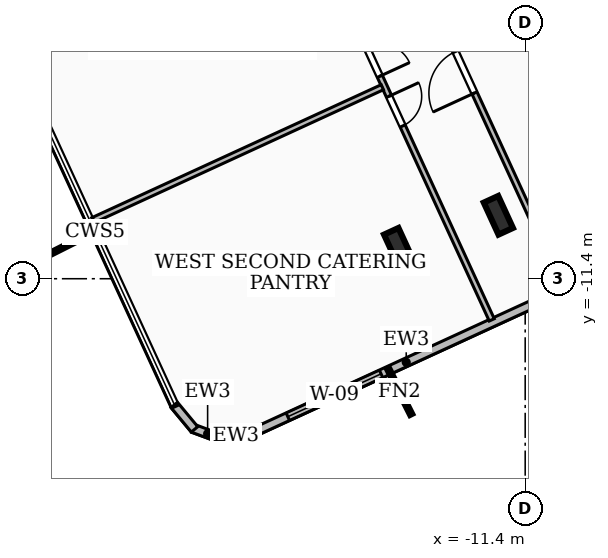
"""IFC4 building model, lengths in metres.
Left out: names, types, materials, properties, quantities, classifications, styles, units other than length and angle.
Written with IfcOpenShell. Run it as: python <this file> out.ifc"""

import sys

from ifc_helpers import new_model, si_unit, direction, frame, frame_2d, origin, origin_2d, place, context, subcontext, project, spatial, rectangle, i_section, extrude, element, fill, save


model = new_model("IFC4")
c1 = context("Model", 3, precision=1e-05, world=origin(), true_north=direction((0.0, 1.0)))
c2 = subcontext(c1, "Body", "Model", "MODEL_VIEW")
j1 = project(units=[si_unit("LENGTHUNIT", "METRE"), si_unit("PLANEANGLEUNIT", "RADIAN")], contexts=[c1])
p1 = place(None, origin())
s1 = spatial("IfcSite", under=j1, at=p1, CompositionType="ELEMENT")
p2 = place(p1, origin())
s2 = spatial("IfcBuilding", under=s1, at=p2, CompositionType="ELEMENT")
p3 = place(p2, frame((0.0, 0.0, 184.68)))
s3 = spatial("IfcBuildingStorey", under=s2, at=p3, CompositionType="ELEMENT", Elevation=184.68)
for number, where, z_axis, x_axis in (
    (1, (-12.106, -9.731, 0.0), (0.0, 0.0, 1.0), (0.909, 0.418, 0.0)),
    (2, (-14.731, -10.573, 0.0), (0.0, 0.0, 1.0), (0.909, 0.418, 0.0)),
):
    element("IfcColumn", number, at=place(p3, frame(where, z_axis=z_axis, x_axis=x_axis)), inside=s3, PredefinedType="COLUMN", context=c2, shape_type="SweptSolid", body=[
        extrude(i_section(OverallWidth=0.418, OverallDepth=0.927, WebThickness=0.019, FlangeThickness=0.032, at=origin_2d()), origin(), (0.0, 0.0, 1.0), 3.6),
    ])
p4 = place(p3, frame((-10.415, -11.708, 0.0), z_axis=(0.0, 0.0, 1.0), x_axis=(-0.908668829641, -0.417517614047, 0.0)))
e3 = element("IfcWall", 3, at=p4, inside=s3, PredefinedType="SOLIDWALL", context=c2, shape_type="SweptSolid", body=[
    extrude(rectangle(XDim=9.058, YDim=0.22, at=frame_2d((4.529, 0.0))), origin(), (0.0, 0.0, 1.0), 3.34),
])
p5 = place(p4, frame((5.258, 0.0, 0.85)))
e4 = element("IfcOpeningElement", 4, at=p5, cuts=e3, PredefinedType="OPENING", context=c2, shape_type="SweptSolid", body=[
    extrude(rectangle(XDim=2.7, YDim=1.65, at=frame_2d((1.35, 0.825))), frame((0.0, 0.12, 0.0), z_axis=(0.0, -1.0, 0.0), x_axis=(1.0, 0.0, 0.0)), (0.0, 0.0, 1.0), 0.24),
])
p6 = place(p3, frame((-18.598, -15.476, 0.0), z_axis=(0.0, 0.0, 1.0), x_axis=(-0.985859228908, -0.167575597201, 0.0)))
e5 = element("IfcWall", 5, at=p6, inside=s3, PredefinedType="SOLIDWALL", context=c2, shape_type="SweptSolid", body=[
    extrude(rectangle(XDim=0.835, YDim=0.22, at=frame_2d((0.417, 0.0))), origin(), (0.0, 0.0, 1.0), 3.34),
])
p7 = place(p3, frame((-19.373, -15.621, 0.0), z_axis=(0.0, 0.0, 1.0), x_axis=(-0.937294412261, 0.348538641681, 0.0)))
e6 = element("IfcWall", 6, at=p7, inside=s3, PredefinedType="SOLIDWALL", context=c2, shape_type="SweptSolid", body=[
    extrude(rectangle(XDim=0.818, YDim=0.22, at=frame_2d((0.409, 0.0))), origin(), (0.0, 0.0, 1.0), 3.34),
])
p8 = place(p3, frame((-20.101, -15.364, 0.0), z_axis=(0.0, 0.0, 1.0), x_axis=(-0.638686746413, 0.769466854359, 0.0)))
e7 = element("IfcWall", 7, at=p8, inside=s3, PredefinedType="SOLIDWALL", context=c2, shape_type="SweptSolid", body=[
    extrude(rectangle(XDim=0.834, YDim=0.22, at=frame_2d((0.417, 0.0))), origin(), (0.0, 0.0, 1.0), 3.34),
])
p9 = place(p3, frame((-8.6, -15.508, 0.0), z_axis=(0.0, 0.0, 1.0), x_axis=(-0.41757132443, 0.908644148726, 0.0)))
e8 = element("IfcWall", 8, at=p9, inside=s3, PredefinedType="PARTITIONING", context=c2, shape_type="SweptSolid", body=[
    extrude(rectangle(XDim=20.521, YDim=0.145, at=frame_2d((10.26, 0.0))), origin(), (0.0, 0.0, 1.0), 2.644),
])
p10 = place(p9, frame((9.9, 0.0, 0.0)))
e9 = element("IfcOpeningElement", 9, at=p10, cuts=e8, PredefinedType="OPENING", context=c2, shape_type="SweptSolid", body=[
    extrude(rectangle(XDim=1.2, YDim=2.1, at=frame_2d((0.6, 1.05))), frame((0.0, 0.083, 0.0), z_axis=(0.0, -1.0, 0.0), x_axis=(1.0, 0.0, 0.0)), (0.0, 0.0, 1.0), 0.165),
])
p11 = place(p3, frame((-15.159, -6.361, 0.0), z_axis=(0.0, 0.0, 1.0), x_axis=(-0.90866370778, -0.417528760881, 0.0)))
e10 = element("IfcWall", 10, at=p11, inside=s3, PredefinedType="PARTITIONING", context=c2, shape_type="SweptSolid", body=[
    extrude(rectangle(XDim=8.385, YDim=0.145, at=frame_2d((4.192, 0.0))), origin(), (0.0, 0.0, 1.0), 3.34),
])
p12 = place(p3, frame((-17.67, -0.752, 0.0), z_axis=(0.0, 0.0, 1.0), x_axis=(0.41749974953, -0.908677037864, 0.0)))
e11 = element("IfcWall", 11, at=p12, inside=s3, PredefinedType="PARTITIONING", context=c2, shape_type="SweptSolid", body=[
    extrude(rectangle(XDim=12.91, YDim=0.145, at=frame_2d((6.455, 0.0))), origin(), (0.0, 0.0, 1.0), 2.644),
])
p13 = place(p12, frame((4.995, 0.0, 0.0)))
e12 = element("IfcOpeningElement", 12, at=p13, cuts=e11, PredefinedType="OPENING", context=c2, shape_type="SweptSolid", body=[
    extrude(rectangle(XDim=0.86, YDim=2.04, at=frame_2d((0.43, 1.02))), frame((0.0, 0.083, 0.0), z_axis=(0.0, -1.0, 0.0), x_axis=(1.0, 0.0, 0.0)), (0.0, 0.0, 1.0), 0.165),
])
p14 = place(p12, frame((6.435, 0.0, 0.0)))
e13 = element("IfcOpeningElement", 13, at=p14, cuts=e11, PredefinedType="OPENING", context=c2, shape_type="SweptSolid", body=[
    extrude(rectangle(XDim=0.86, YDim=2.04, at=frame_2d((0.43, 1.02))), frame((0.0, 0.083, 0.0), z_axis=(0.0, -1.0, 0.0), x_axis=(1.0, 0.0, 0.0)), (0.0, 0.0, 1.0), 0.165),
])
p15 = place(p5, origin())
e14 = element("IfcWindow", 14, at=p15, inside=s3, PartitioningType="SINGLE_PANEL", PredefinedType="WINDOW", context=c2, shape_type="SweptSolid", body=[
    extrude(rectangle(XDim=2.7, YDim=1.65, at=frame_2d((1.35, 0.825))), frame((0.0, 0.03, 0.0), z_axis=(0.0, -1.0, 0.0), x_axis=(1.0, 0.0, 0.0)), (0.0, 0.0, 1.0), 0.06),
])
fill(e4, e14)
p16 = place(p10, origin())
e15 = element("IfcDoor", 15, at=p16, inside=s3, OperationType="SINGLE_SWING_LEFT", PredefinedType="DOOR", context=c2, shape_type="SweptSolid", body=[
    extrude(rectangle(XDim=1.2, YDim=2.1, at=frame_2d((0.6, 1.05))), frame((0.0, 0.025, 0.0), z_axis=(0.0, -1.0, 0.0), x_axis=(1.0, 0.0, 0.0)), (0.0, 0.0, 1.0), 0.05),
])
fill(e9, e15)
p17 = place(p13, origin())
e16 = element("IfcDoor", 16, at=p17, inside=s3, OperationType="SINGLE_SWING_RIGHT", PredefinedType="DOOR", context=c2, shape_type="SweptSolid", body=[
    extrude(rectangle(XDim=0.86, YDim=2.04, at=frame_2d((0.43, 1.02))), frame((0.0, 0.025, 0.0), z_axis=(0.0, -1.0, 0.0), x_axis=(1.0, 0.0, 0.0)), (0.0, 0.0, 1.0), 0.05),
])
fill(e12, e16)
p18 = place(p14, origin())
e17 = element("IfcDoor", 17, at=p18, inside=s3, OperationType="SINGLE_SWING_LEFT", PredefinedType="DOOR", context=c2, shape_type="SweptSolid", body=[
    extrude(rectangle(XDim=0.86, YDim=2.04, at=frame_2d((0.43, 1.02))), frame((0.0, 0.025, 0.0), z_axis=(0.0, -1.0, 0.0), x_axis=(1.0, 0.0, 0.0)), (0.0, 0.0, 1.0), 0.05),
])
fill(e13, e17)
save(model, sys.argv[1])
